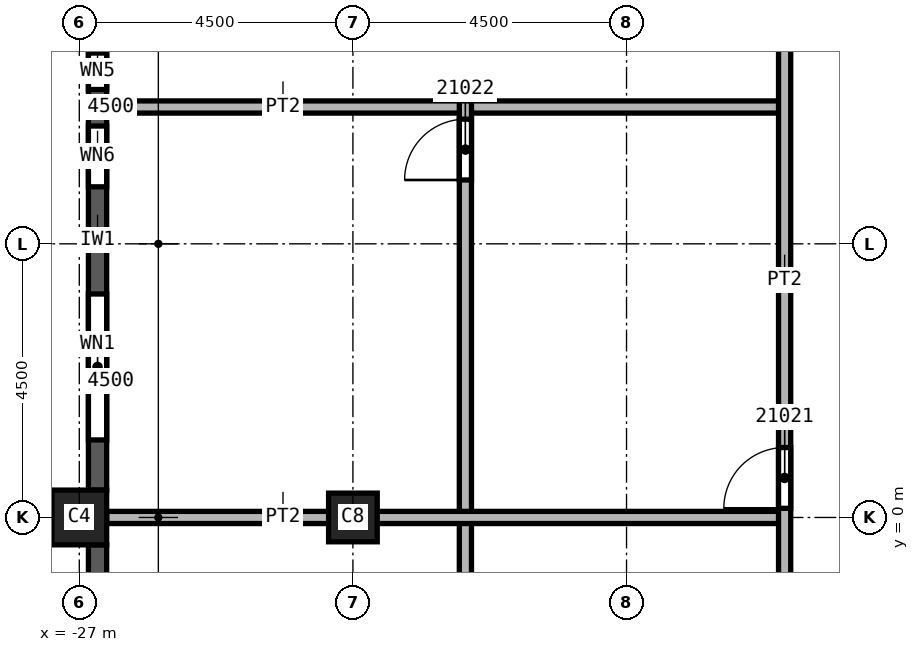
"""IFC4 building model, lengths in metres.
Left out: names, types, materials, properties, quantities, classifications, styles, units other than length and angle.
Written with IfcOpenShell. Run it as: python <this file> out.ifc"""

import sys

from ifc_helpers import new_model, si_unit, direction, frame, frame_2d, origin, origin_2d, place, context, subcontext, project, spatial, rectangle, extrude, element, fill, save


model = new_model("IFC4")
c1 = context("Model", 3, precision=1e-05, world=origin(), true_north=direction((0.0, 1.0)))
c2 = subcontext(c1, "Body", "Model", "MODEL_VIEW")
j1 = project(units=[si_unit("LENGTHUNIT", "METRE"), si_unit("PLANEANGLEUNIT", "RADIAN")], contexts=[c1])
p1 = place(None, origin())
s1 = spatial("IfcSite", under=j1, at=p1, CompositionType="ELEMENT")
p2 = place(p1, origin())
s2 = spatial("IfcBuilding", under=s1, at=p2, CompositionType="ELEMENT")
p3 = place(p2, frame((0.0, 0.0, 304.0)))
s3 = spatial("IfcBuildingStorey", under=s2, at=p3, CompositionType="ELEMENT", Elevation=304.0)
p4 = place(p3, frame((-22.5, 0.0, 0.0), z_axis=(0.0, 0.0, 1.0), x_axis=(1.0, 0.0, 0.0)))
e1 = element("IfcColumn", 1, at=p4, inside=s3, PredefinedType="COLUMN", context=c2, shape_type="SweptSolid", body=[
    extrude(rectangle(XDim=0.8, YDim=0.8, at=origin_2d()), origin(), (0.0, 0.0, 1.0), 3.74),
])
p5 = place(p3, frame((-27.0, 0.0, 0.0), z_axis=(0.0, 0.0, 1.0), x_axis=(0.0, 1.0, 0.0)))
e2 = element("IfcColumn", 2, at=p5, inside=s3, PredefinedType="COLUMN", context=c2, shape_type="SweptSolid", body=[
    extrude(rectangle(XDim=0.9, YDim=0.9, at=origin_2d()), origin(), (0.0, 0.0, 1.0), 3.74),
])
p6 = place(p3, frame((-26.7, 8.55, 0.0), z_axis=(0.0, 0.0, 1.0), x_axis=(0.0, -1.0, 0.0)))
e3 = element("IfcWall", 3, at=p6, inside=s3, PredefinedType="SOLIDWALL", context=c2, shape_type="SweptSolid", body=[
    extrude(rectangle(XDim=8.1, YDim=0.3, at=frame_2d((4.05, 0.0))), origin(), (0.0, 0.0, 1.0), 3.14),
])
p7 = place(p6, frame((4.875, 0.0, 0.8)))
e4 = element("IfcOpeningElement", 4, at=p7, cuts=e3, PredefinedType="OPENING", context=c2, shape_type="SweptSolid", body=[
    extrude(rectangle(XDim=2.4, YDim=1.95, at=frame_2d((1.2, 0.975))), frame((0.0, 0.15, 0.0), z_axis=(0.0, -1.0, 0.0), x_axis=(1.0, 0.0, 0.0)), (0.0, 0.0, 1.0), 0.3),
])
p8 = place(p6, frame((0.913, 0.0, 0.8)))
e5 = element("IfcOpeningElement", 5, at=p8, cuts=e3, PredefinedType="OPENING", context=c2, shape_type="SweptSolid", body=[
    extrude(rectangle(XDim=0.6, YDim=1.95, at=frame_2d((0.3, 0.975))), frame((0.0, 0.15, 0.0), z_axis=(0.0, -1.0, 0.0), x_axis=(1.0, 0.0, 0.0)), (0.0, 0.0, 1.0), 0.3),
])
p9 = place(p6, frame((2.113, 0.0, 0.8)))
e6 = element("IfcOpeningElement", 6, at=p9, cuts=e3, PredefinedType="OPENING", context=c2, shape_type="SweptSolid", body=[
    extrude(rectangle(XDim=1.0, YDim=1.95, at=frame_2d((0.5, 0.975))), frame((0.0, 0.15, 0.0), z_axis=(0.0, -1.0, 0.0), x_axis=(1.0, 0.0, 0.0)), (0.0, 0.0, 1.0), 0.3),
])
p10 = place(p3, frame((-26.7, -0.45, 0.0), z_axis=(0.0, 0.0, 1.0), x_axis=(0.0, -1.0, 0.0)))
e7 = element("IfcWall", 7, at=p10, inside=s3, PredefinedType="SOLIDWALL", context=c2, shape_type="SweptSolid", body=[
    extrude(rectangle(XDim=8.1, YDim=0.3, at=frame_2d((4.05, 0.0))), origin(), (0.0, 0.0, 1.0), 3.14),
])
p11 = place(p10, frame((0.825, 0.0, 0.8)))
e8 = element("IfcOpeningElement", 8, at=p11, cuts=e7, PredefinedType="OPENING", context=c2, shape_type="SweptSolid", body=[
    extrude(rectangle(XDim=2.4, YDim=1.95, at=frame_2d((1.2, 0.975))), frame((0.0, 0.15, 0.0), z_axis=(0.0, -1.0, 0.0), x_axis=(1.0, 0.0, 0.0)), (0.0, 0.0, 1.0), 0.3),
])
p12 = place(p10, frame((4.875, 0.0, 0.8)))
e9 = element("IfcOpeningElement", 9, at=p12, cuts=e7, PredefinedType="OPENING", context=c2, shape_type="SweptSolid", body=[
    extrude(rectangle(XDim=2.4, YDim=1.95, at=frame_2d((1.2, 0.975))), frame((0.0, 0.15, 0.0), z_axis=(0.0, -1.0, 0.0), x_axis=(1.0, 0.0, 0.0)), (0.0, 0.0, 1.0), 0.3),
])
p13 = place(p3, frame((-26.55, 6.75, 0.0), z_axis=(0.0, 0.0, 1.0), x_axis=(1.0, 0.0, 0.0)))
e10 = element("IfcWall", 10, at=p13, inside=s3, PredefinedType="PARTITIONING", context=c2, shape_type="SweptSolid", body=[
    extrude(rectangle(XDim=11.15, YDim=0.2, at=frame_2d((5.575, 0.0))), origin(), (0.0, 0.0, 1.0), 3.74),
])
p14 = place(p3, frame((-20.65, -11.25, 0.0), z_axis=(0.0, 0.0, 1.0), x_axis=(0.0, 1.0, 0.0)))
e11 = element("IfcWall", 11, at=p14, inside=s3, PredefinedType="PARTITIONING", context=c2, shape_type="SweptSolid", body=[
    extrude(rectangle(XDim=18.1, YDim=0.2, at=frame_2d((9.05, 0.0))), origin(), (0.0, 0.0, 1.0), 3.74),
])
p15 = place(p14, frame((16.8, 0.0, 0.0)))
e12 = element("IfcOpeningElement", 12, at=p15, cuts=e11, PredefinedType="OPENING", context=c2, shape_type="SweptSolid", body=[
    extrude(rectangle(XDim=1.0, YDim=2.1, at=frame_2d((0.5, 1.05))), frame((0.0, 0.1, 0.0), z_axis=(0.0, -1.0, 0.0), x_axis=(1.0, 0.0, 0.0)), (0.0, 0.0, 1.0), 0.2),
])
p16 = place(p14, frame((3.1, 0.0, 0.0)))
e13 = element("IfcOpeningElement", 13, at=p16, cuts=e11, PredefinedType="OPENING", context=c2, shape_type="SweptSolid", body=[
    extrude(rectangle(XDim=1.0, YDim=2.1, at=frame_2d((0.5, 1.05))), frame((0.0, 0.1, 0.0), z_axis=(0.0, -1.0, 0.0), x_axis=(1.0, 0.0, 0.0)), (0.0, 0.0, 1.0), 0.2),
])
p17 = place(p3, frame((-15.4, 0.0, 0.0), z_axis=(0.0, 0.0, 1.0), x_axis=(-1.0, 0.0, 0.0)))
e14 = element("IfcWall", 14, at=p17, inside=s3, PredefinedType="PARTITIONING", context=c2, shape_type="SweptSolid", body=[
    extrude(rectangle(XDim=11.15, YDim=0.2, at=frame_2d((5.575, 0.0))), origin(), (0.0, 0.0, 1.0), 3.74),
])
p18 = place(p3, frame((-15.4, -22.95, 0.0), z_axis=(0.0, 0.0, 1.0), x_axis=(0.0, 1.0, 0.0)))
e15 = element("IfcWall", 15, at=p18, inside=s3, PredefinedType="PARTITIONING", context=c2, shape_type="SweptSolid", body=[
    extrude(rectangle(XDim=36.55, YDim=0.2, at=frame_2d((18.275, 0.0))), origin(), (0.0, 0.0, 1.0), 3.74),
])
p19 = place(p18, frame((23.1, 0.0, 0.0)))
e16 = element("IfcOpeningElement", 16, at=p19, cuts=e15, PredefinedType="OPENING", context=c2, shape_type="SweptSolid", body=[
    extrude(rectangle(XDim=1.0, YDim=2.1, at=frame_2d((0.5, 1.05))), frame((0.0, 0.1, 0.0), z_axis=(0.0, -1.0, 0.0), x_axis=(1.0, 0.0, 0.0)), (0.0, 0.0, 1.0), 0.2),
])
p20 = place(p18, frame((34.35, 0.0, 0.0)))
e17 = element("IfcOpeningElement", 17, at=p20, cuts=e15, PredefinedType="OPENING", context=c2, shape_type="SweptSolid", body=[
    extrude(rectangle(XDim=1.0, YDim=2.1, at=frame_2d((0.5, 1.05))), frame((0.0, 0.1, 0.0), z_axis=(0.0, -1.0, 0.0), x_axis=(1.0, 0.0, 0.0)), (0.0, 0.0, 1.0), 0.2),
])
p21 = place(p18, frame((2.95, 0.0, 0.0)))
e18 = element("IfcOpeningElement", 18, at=p21, cuts=e15, PredefinedType="OPENING", context=c2, shape_type="SweptSolid", body=[
    extrude(rectangle(XDim=1.0, YDim=2.1, at=frame_2d((0.5, 1.05))), frame((0.0, 0.1, 0.0), z_axis=(0.0, -1.0, 0.0), x_axis=(1.0, 0.0, 0.0)), (0.0, 0.0, 1.0), 0.2),
])
p22 = place(p18, frame((6.15, 0.0, 0.0)))
e19 = element("IfcOpeningElement", 19, at=p22, cuts=e15, PredefinedType="OPENING", context=c2, shape_type="SweptSolid", body=[
    extrude(rectangle(XDim=1.0, YDim=2.1, at=frame_2d((0.5, 1.05))), frame((0.0, 0.1, 0.0), z_axis=(0.0, -1.0, 0.0), x_axis=(1.0, 0.0, 0.0)), (0.0, 0.0, 1.0), 0.2),
])
p23 = place(p18, frame((8.625, 0.0, 0.0)))
e20 = element("IfcOpeningElement", 20, at=p23, cuts=e15, PredefinedType="OPENING", context=c2, shape_type="SweptSolid", body=[
    extrude(rectangle(XDim=1.0, YDim=2.1, at=frame_2d((0.5, 1.05))), frame((0.0, 0.1, 0.0), z_axis=(0.0, -1.0, 0.0), x_axis=(1.0, 0.0, 0.0)), (0.0, 0.0, 1.0), 0.2),
])
p24 = place(p18, frame((15.0, 0.0, 0.0)))
e21 = element("IfcOpeningElement", 21, at=p24, cuts=e15, PredefinedType="OPENING", context=c2, shape_type="SweptSolid", body=[
    extrude(rectangle(XDim=1.0, YDim=2.1, at=frame_2d((0.5, 1.05))), frame((0.0, 0.1, 0.0), z_axis=(0.0, -1.0, 0.0), x_axis=(1.0, 0.0, 0.0)), (0.0, 0.0, 1.0), 0.2),
])
p25 = place(p7, origin())
e22 = element("IfcWindow", 22, at=p25, inside=s3, PartitioningType="SINGLE_PANEL", PredefinedType="WINDOW", context=c2, shape_type="SweptSolid", body=[
    extrude(rectangle(XDim=2.4, YDim=1.95, at=frame_2d((1.2, 0.975))), frame((0.0, 0.03, 0.0), z_axis=(0.0, -1.0, 0.0), x_axis=(1.0, 0.0, 0.0)), (0.0, 0.0, 1.0), 0.06),
])
fill(e4, e22)
p26 = place(p19, origin())
e23 = element("IfcDoor", 23, at=p26, inside=s3, OperationType="SINGLE_SWING_RIGHT", PredefinedType="DOOR", context=c2, shape_type="SweptSolid", body=[
    extrude(rectangle(XDim=1.0, YDim=2.1, at=frame_2d((0.5, 1.05))), frame((0.0, 0.025, 0.0), z_axis=(0.0, -1.0, 0.0), x_axis=(1.0, 0.0, 0.0)), (0.0, 0.0, 1.0), 0.05),
])
fill(e16, e23)
p27 = place(p15, origin())
e24 = element("IfcDoor", 24, at=p27, inside=s3, OperationType="SINGLE_SWING_LEFT", PredefinedType="DOOR", context=c2, shape_type="SweptSolid", body=[
    extrude(rectangle(XDim=1.0, YDim=2.1, at=frame_2d((0.5, 1.05))), frame((0.0, 0.025, 0.0), z_axis=(0.0, -1.0, 0.0), x_axis=(1.0, 0.0, 0.0)), (0.0, 0.0, 1.0), 0.05),
])
fill(e12, e24)
p28 = place(p8, origin())
e25 = element("IfcWindow", 25, at=p28, inside=s3, PartitioningType="SINGLE_PANEL", PredefinedType="WINDOW", context=c2, shape_type="SweptSolid", body=[
    extrude(rectangle(XDim=0.6, YDim=1.95, at=frame_2d((0.3, 0.975))), frame((0.0, 0.03, 0.0), z_axis=(0.0, -1.0, 0.0), x_axis=(1.0, 0.0, 0.0)), (0.0, 0.0, 1.0), 0.06),
])
fill(e5, e25)
p29 = place(p9, origin())
e26 = element("IfcWindow", 26, at=p29, inside=s3, PartitioningType="SINGLE_PANEL", PredefinedType="WINDOW", context=c2, shape_type="SweptSolid", body=[
    extrude(rectangle(XDim=1.0, YDim=1.95, at=frame_2d((0.5, 0.975))), frame((0.0, 0.03, 0.0), z_axis=(0.0, -1.0, 0.0), x_axis=(1.0, 0.0, 0.0)), (0.0, 0.0, 1.0), 0.06),
])
fill(e6, e26)
save(model, sys.argv[1])
